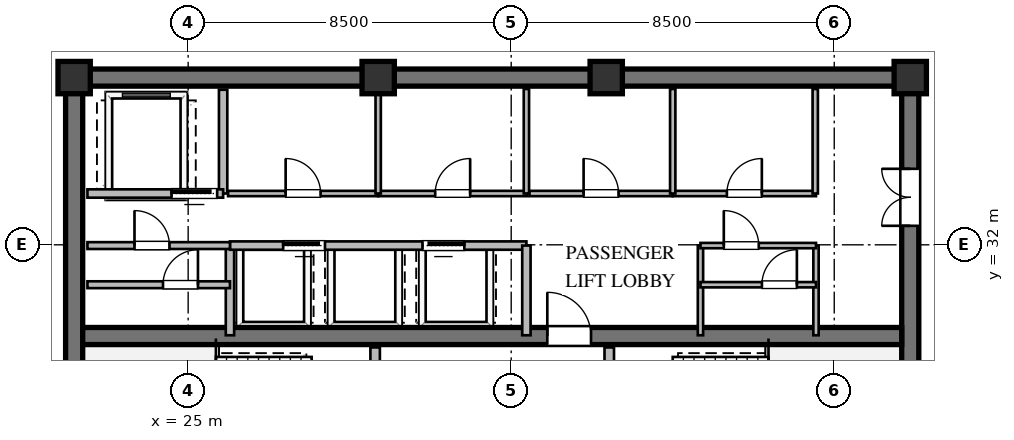
"""IFC4 building model, lengths in metres.
Left out: names, types, materials, properties, quantities, classifications, styles, units other than length and angle.
Written with IfcOpenShell. Run it as: python <this file> out.ifc"""

import sys

from ifc_helpers import new_model, si_unit, direction, frame, frame_2d, origin, origin_2d, place, context, subcontext, project, spatial, rectangle, extrude, element, fill, save


model = new_model("IFC4")
c1 = context("Model", 3, precision=1e-05, world=origin(), true_north=direction((0.0, 1.0)))
c2 = subcontext(c1, "Body", "Model", "MODEL_VIEW")
j1 = project(units=[si_unit("LENGTHUNIT", "METRE"), si_unit("PLANEANGLEUNIT", "RADIAN")], contexts=[c1])
p1 = place(None, origin())
s1 = spatial("IfcSite", under=j1, at=p1, CompositionType="ELEMENT")
p2 = place(p1, origin())
s2 = spatial("IfcBuilding", under=s1, at=p2, CompositionType="ELEMENT")
p3 = place(p2, frame((0.0, 0.0, 224.4)))
s3 = spatial("IfcBuildingStorey", under=s2, at=p3, CompositionType="ELEMENT", Elevation=224.4)
p4 = place(p3, frame((21.775, 36.4, 0.0), z_axis=(0.0, 0.0, 1.0), x_axis=(1.0, 0.0, 0.0)))
e1 = element("IfcWall", 1, at=p4, inside=s3, PredefinedType="SHEAR", context=c2, shape_type="SweptSolid", body=[
    extrude(rectangle(XDim=22.45, YDim=0.45, at=frame_2d((11.225, 0.0))), origin(), (0.0, 0.0, 1.0), 3.36),
])
p5 = place(p3, frame((22.0, 23.825, 0.0), z_axis=(0.0, 0.0, 1.0), x_axis=(0.0, 1.0, 0.0)))
e2 = element("IfcWall", 2, at=p5, inside=s3, PredefinedType="SHEAR", context=c2, shape_type="SweptSolid", body=[
    extrude(rectangle(XDim=12.35, YDim=0.45, at=frame_2d((6.175, 0.0))), origin(), (0.0, 0.0, 1.0), 3.36),
])
p6 = place(p3, frame((44.0, 23.825, 0.0), z_axis=(0.0, 0.0, 1.0), x_axis=(0.0, 1.0, 0.0)))
e3 = element("IfcWall", 3, at=p6, inside=s3, PredefinedType="SHEAR", context=c2, shape_type="SweptSolid", body=[
    extrude(rectangle(XDim=12.35, YDim=0.45, at=frame_2d((6.175, 0.0))), origin(), (0.0, 0.0, 1.0), 3.36),
])
p7 = place(p6, frame((8.675, 0.0, 0.0)))
e4 = element("IfcOpeningElement", 4, at=p7, cuts=e3, PredefinedType="OPENING", context=c2, shape_type="SweptSolid", body=[
    extrude(rectangle(XDim=1.5, YDim=2.15, at=frame_2d((0.75, 1.075))), frame((0.0, 0.235, 0.0), z_axis=(0.0, -1.0, 0.0), x_axis=(1.0, 0.0, 0.0)), (0.0, 0.0, 1.0), 0.47),
])
p8 = place(p3, frame((22.225, 29.6, 0.0), z_axis=(0.0, 0.0, 1.0), x_axis=(1.0, 0.0, 0.0)))
e5 = element("IfcWall", 5, at=p8, inside=s3, PredefinedType="SHEAR", context=c2, shape_type="SweptSolid", body=[
    extrude(rectangle(XDim=21.55, YDim=0.45, at=frame_2d((10.775, 0.0))), origin(), (0.0, 0.0, 1.0), 3.36),
])
p9 = place(p8, frame((12.225, 0.0, 0.0)))
e6 = element("IfcOpeningElement", 6, at=p9, cuts=e5, PredefinedType="OPENING", context=c2, shape_type="SweptSolid", body=[
    extrude(rectangle(XDim=1.15, YDim=2.1, at=frame_2d((0.575, 1.05))), frame((0.0, 0.235, 0.0), z_axis=(0.0, -1.0, 0.0), x_axis=(1.0, 0.0, 0.0)), (0.0, 0.0, 1.0), 0.47),
])
for number, where, z_axis, x_axis in (
    (7, (44.0, 36.4, 0.0), (0.0, 0.0, 1.0), (1.0, 0.0, 0.0)),
    (8, (36.0, 36.4, 0.0), (0.0, 0.0, 1.0), (1.0, 0.0, 0.0)),
    (9, (30.0, 36.4, 0.0), (0.0, 0.0, 1.0), (1.0, 0.0, 0.0)),
    (10, (22.0, 36.4, 0.0), (0.0, 0.0, 1.0), (1.0, 0.0, 0.0)),
):
    element("IfcColumn", number, at=place(p3, frame(where, z_axis=z_axis, x_axis=x_axis)), inside=s3, PredefinedType="COLUMN", context=c2, shape_type="SweptSolid", body=[
        extrude(rectangle(XDim=0.85, YDim=0.85, at=origin_2d()), origin(), (0.0, 0.0, 1.0), 3.6),
    ])
p10 = place(p3, frame((29.92, 23.9, 0.0), z_axis=(0.0, 0.0, 1.0), x_axis=(0.0, 1.0, 0.0)))
e11 = element("IfcWall", 11, at=p10, inside=s3, PredefinedType="SOLIDWALL", context=c2, shape_type="SweptSolid", body=[
    extrude(rectangle(XDim=5.4, YDim=0.25, at=frame_2d((2.7, 0.0))), origin(), (0.0, 0.0, 1.0), 3.36),
])
p11 = place(p10, frame((3.421, 0.0, 0.0)))
e12 = element("IfcOpeningElement", 12, at=p11, cuts=e11, PredefinedType="OPENING", context=c2, shape_type="SweptSolid", body=[
    extrude(rectangle(XDim=1.15, YDim=2.1, at=frame_2d((0.575, 1.05))), frame((0.0, 0.135, 0.0), z_axis=(0.0, -1.0, 0.0), x_axis=(1.0, 0.0, 0.0)), (0.0, 0.0, 1.0), 0.27),
])
p12 = place(p3, frame((36.08, 23.9, 0.0), z_axis=(0.0, 0.0, 1.0), x_axis=(0.0, 1.0, 0.0)))
e13 = element("IfcWall", 13, at=p12, inside=s3, PredefinedType="SOLIDWALL", context=c2, shape_type="SweptSolid", body=[
    extrude(rectangle(XDim=5.4, YDim=0.25, at=frame_2d((2.7, 0.0))), origin(), (0.0, 0.0, 1.0), 3.36),
])
p13 = place(p12, frame((3.421, 0.0, 0.0)))
e14 = element("IfcOpeningElement", 14, at=p13, cuts=e13, PredefinedType="OPENING", context=c2, shape_type="SweptSolid", body=[
    extrude(rectangle(XDim=1.15, YDim=2.1, at=frame_2d((0.575, 1.05))), frame((0.0, 0.135, 0.0), z_axis=(0.0, -1.0, 0.0), x_axis=(1.0, 0.0, 0.0)), (0.0, 0.0, 1.0), 0.27),
])
p14 = place(p3, frame((25.92, 33.35, 0.0), z_axis=(0.0, 0.0, 1.0), x_axis=(0.0, 1.0, 0.0)))
e15 = element("IfcWall", 15, at=p14, inside=s3, PredefinedType="SOLIDWALL", context=c2, shape_type="SweptSolid", body=[
    extrude(rectangle(XDim=2.73, YDim=0.22, at=frame_2d((1.365, 0.0))), origin(), (0.0, 0.0, 1.0), 3.36),
])
p15 = place(p3, frame((22.35, 33.35, 0.0), z_axis=(0.0, 0.0, 1.0), x_axis=(1.0, 0.0, 0.0)))
e16 = element("IfcWall", 16, at=p15, inside=s3, PredefinedType="SOLIDWALL", context=c2, shape_type="SweptSolid", body=[
    extrude(rectangle(XDim=3.57, YDim=0.22, at=frame_2d((1.785, 0.0))), origin(), (0.0, 0.0, 1.0), 3.36),
])
p16 = place(p15, frame((2.213, 0.0, 0.0)))
e17 = element("IfcOpeningElement", 17, at=p16, cuts=e16, PredefinedType="OPENING", context=c2, shape_type="SweptSolid", body=[
    extrude(rectangle(XDim=1.2, YDim=2.1, at=frame_2d((0.6, 1.05))), frame((0.0, 0.12, 0.0), z_axis=(0.0, -1.0, 0.0), x_axis=(1.0, 0.0, 0.0)), (0.0, 0.0, 1.0), 0.24),
])
p17 = place(p3, frame((26.1, 29.62, 0.0), z_axis=(0.0, 0.0, 1.0), x_axis=(0.0, 1.0, 0.0)))
e18 = element("IfcWall", 18, at=p17, inside=s3, PredefinedType="SOLIDWALL", context=c2, shape_type="SweptSolid", body=[
    extrude(rectangle(XDim=2.36, YDim=0.22, at=frame_2d((1.18, 0.0))), origin(), (0.0, 0.0, 1.0), 3.36),
])
p18 = place(p3, frame((26.1, 31.98, 0.0), z_axis=(0.0, 0.0, 1.0), x_axis=(1.0, 0.0, 0.0)))
e19 = element("IfcWall", 19, at=p18, inside=s3, PredefinedType="SOLIDWALL", context=c2, shape_type="SweptSolid", body=[
    extrude(rectangle(XDim=7.8, YDim=0.22, at=frame_2d((3.9, 0.0))), origin(), (0.0, 0.0, 1.0), 3.36),
])
p19 = place(p18, frame((1.4, 0.0, 0.0)))
e20 = element("IfcOpeningElement", 20, at=p19, cuts=e19, PredefinedType="OPENING", context=c2, shape_type="SweptSolid", body=[
    extrude(rectangle(XDim=1.1, YDim=2.1, at=frame_2d((0.55, 1.05))), frame((0.0, 0.12, 0.0), z_axis=(0.0, -1.0, 0.0), x_axis=(1.0, 0.0, 0.0)), (0.0, 0.0, 1.0), 0.24),
])
p20 = place(p18, frame((5.066, 0.0, 0.0)))
e21 = element("IfcOpeningElement", 21, at=p20, cuts=e19, PredefinedType="OPENING", context=c2, shape_type="SweptSolid", body=[
    extrude(rectangle(XDim=1.1, YDim=2.1, at=frame_2d((0.55, 1.05))), frame((0.0, 0.12, 0.0), z_axis=(0.0, -1.0, 0.0), x_axis=(1.0, 0.0, 0.0)), (0.0, 0.0, 1.0), 0.24),
])
p21 = place(p3, frame((33.9, 29.62, 0.0), z_axis=(0.0, 0.0, 1.0), x_axis=(0.0, 1.0, 0.0)))
e22 = element("IfcWall", 22, at=p21, inside=s3, PredefinedType="SOLIDWALL", context=c2, shape_type="SweptSolid", body=[
    extrude(rectangle(XDim=2.36, YDim=0.22, at=frame_2d((1.18, 0.0))), origin(), (0.0, 0.0, 1.0), 3.36),
])
p22 = place(p3, frame((26.05, 33.35, 0.0), z_axis=(0.0, 0.0, 1.0), x_axis=(1.0, 0.0, 0.0)))
e23 = element("IfcWall", 23, at=p22, inside=s3, PredefinedType="PARTITIONING", context=c2, shape_type="SweptSolid", body=[
    extrude(rectangle(XDim=3.95, YDim=0.14, at=frame_2d((1.975, 0.0))), origin(), (0.0, 0.0, 1.0), 3.36),
])
p23 = place(p22, frame((1.515, 0.0, 0.0)))
e24 = element("IfcOpeningElement", 24, at=p23, cuts=e23, PredefinedType="OPENING", context=c2, shape_type="SweptSolid", body=[
    extrude(rectangle(XDim=0.92, YDim=2.1, at=frame_2d((0.46, 1.05))), frame((0.0, 0.08, 0.0), z_axis=(0.0, -1.0, 0.0), x_axis=(1.0, 0.0, 0.0)), (0.0, 0.0, 1.0), 0.16),
])
p24 = place(p3, frame((30.0, 33.35, 0.0), z_axis=(0.0, 0.0, 1.0), x_axis=(1.0, 0.0, 0.0)))
e25 = element("IfcWall", 25, at=p24, inside=s3, PredefinedType="PARTITIONING", context=c2, shape_type="SweptSolid", body=[
    extrude(rectangle(XDim=3.92, YDim=0.14, at=frame_2d((1.96, 0.0))), origin(), (0.0, 0.0, 1.0), 3.36),
])
p25 = place(p24, frame((1.5, 0.0, 0.0)))
e26 = element("IfcOpeningElement", 26, at=p25, cuts=e25, PredefinedType="OPENING", context=c2, shape_type="SweptSolid", body=[
    extrude(rectangle(XDim=0.92, YDim=2.1, at=frame_2d((0.46, 1.05))), frame((0.0, 0.08, 0.0), z_axis=(0.0, -1.0, 0.0), x_axis=(1.0, 0.0, 0.0)), (0.0, 0.0, 1.0), 0.16),
])
for number, where, z_axis, x_axis in (
    (27, (30.0, 33.35, 0.0), (0.0, 0.0, 1.0), (0.0, 1.0, 0.0)),
    (28, (33.9, 33.35, 0.0), (0.0, 0.0, 1.0), (0.0, 1.0, 0.0)),
):
    element("IfcWall", number, at=place(p3, frame(where, z_axis=z_axis, x_axis=x_axis)), inside=s3, PredefinedType="PARTITIONING", context=c2, shape_type="SweptSolid", body=[
        extrude(rectangle(XDim=2.75, YDim=0.14, at=frame_2d((1.375, 0.0))), origin(), (0.0, 0.0, 1.0), 3.36),
    ])
p26 = place(p3, frame((33.98, 33.35, 0.0), z_axis=(0.0, 0.0, 1.0), x_axis=(1.0, 0.0, 0.0)))
e29 = element("IfcWall", 29, at=p26, inside=s3, PredefinedType="PARTITIONING", context=c2, shape_type="SweptSolid", body=[
    extrude(rectangle(XDim=3.77, YDim=0.14, at=frame_2d((1.885, 0.0))), origin(), (0.0, 0.0, 1.0), 3.36),
])
p27 = place(p26, frame((1.425, 0.0, 0.0)))
e30 = element("IfcOpeningElement", 30, at=p27, cuts=e29, PredefinedType="OPENING", context=c2, shape_type="SweptSolid", body=[
    extrude(rectangle(XDim=0.92, YDim=2.1, at=frame_2d((0.46, 1.05))), frame((0.0, 0.08, 0.0), z_axis=(0.0, -1.0, 0.0), x_axis=(1.0, 0.0, 0.0)), (0.0, 0.0, 1.0), 0.16),
])
p28 = place(p3, frame((37.75, 33.35, 0.0), z_axis=(0.0, 0.0, 1.0), x_axis=(1.0, 0.0, 0.0)))
e31 = element("IfcWall", 31, at=p28, inside=s3, PredefinedType="PARTITIONING", context=c2, shape_type="SweptSolid", body=[
    extrude(rectangle(XDim=3.77, YDim=0.14, at=frame_2d((1.885, 0.0))), origin(), (0.0, 0.0, 1.0), 3.36),
])
p29 = place(p28, frame((1.425, 0.0, 0.0)))
e32 = element("IfcOpeningElement", 32, at=p29, cuts=e31, PredefinedType="OPENING", context=c2, shape_type="SweptSolid", body=[
    extrude(rectangle(XDim=0.92, YDim=2.1, at=frame_2d((0.46, 1.05))), frame((0.0, 0.08, 0.0), z_axis=(0.0, -1.0, 0.0), x_axis=(1.0, 0.0, 0.0)), (0.0, 0.0, 1.0), 0.16),
])
for number, where, z_axis, x_axis in (
    (33, (37.75, 33.35, 0.0), (0.0, 0.0, 1.0), (0.0, 1.0, 0.0)),
    (34, (41.5, 33.35, 0.0), (0.0, 0.0, 1.0), (0.0, 1.0, 0.0)),
):
    element("IfcWall", number, at=place(p3, frame(where, z_axis=z_axis, x_axis=x_axis)), inside=s3, PredefinedType="PARTITIONING", context=c2, shape_type="SweptSolid", body=[
        extrude(rectangle(XDim=2.75, YDim=0.14, at=frame_2d((1.375, 0.0))), origin(), (0.0, 0.0, 1.0), 3.36),
    ])
p30 = place(p3, frame((22.35, 30.95, 0.0), z_axis=(0.0, 0.0, 1.0), x_axis=(1.0, 0.0, 0.0)))
e35 = element("IfcWall", 35, at=p30, inside=s3, PredefinedType="PARTITIONING", context=c2, shape_type="SweptSolid", body=[
    extrude(rectangle(XDim=3.75, YDim=0.18, at=frame_2d((1.875, 0.0))), origin(), (0.0, 0.0, 1.0), 3.36),
])
p31 = place(p30, frame((1.988, 0.0, 0.0)))
e36 = element("IfcOpeningElement", 36, at=p31, cuts=e35, PredefinedType="OPENING", context=c2, shape_type="SweptSolid", body=[
    extrude(rectangle(XDim=0.92, YDim=2.1, at=frame_2d((0.46, 1.05))), frame((0.0, 0.1, 0.0), z_axis=(0.0, -1.0, 0.0), x_axis=(1.0, 0.0, 0.0)), (0.0, 0.0, 1.0), 0.2),
])
p32 = place(p3, frame((22.35, 31.98, 0.0), z_axis=(0.0, 0.0, 1.0), x_axis=(1.0, 0.0, 0.0)))
e37 = element("IfcWall", 37, at=p32, inside=s3, PredefinedType="PARTITIONING", context=c2, shape_type="SweptSolid", body=[
    extrude(rectangle(XDim=3.75, YDim=0.18, at=frame_2d((1.875, 0.0))), origin(), (0.0, 0.0, 1.0), 3.36),
])
p33 = place(p32, frame((1.238, 0.0, 0.0)))
e38 = element("IfcOpeningElement", 38, at=p33, cuts=e37, PredefinedType="OPENING", context=c2, shape_type="SweptSolid", body=[
    extrude(rectangle(XDim=0.92, YDim=2.1, at=frame_2d((0.46, 1.05))), frame((0.0, 0.1, 0.0), z_axis=(0.0, -1.0, 0.0), x_axis=(1.0, 0.0, 0.0)), (0.0, 0.0, 1.0), 0.2),
])
for number, where, z_axis, x_axis in (
    (39, (38.48, 29.62, 0.0), (0.0, 0.0, 1.0), (0.0, 1.0, 0.0)),
    (40, (41.52, 29.62, 0.0), (0.0, 0.0, 1.0), (0.0, 1.0, 0.0)),
):
    element("IfcWall", number, at=place(p3, frame(where, z_axis=z_axis, x_axis=x_axis)), inside=s3, PredefinedType="PARTITIONING", context=c2, shape_type="SweptSolid", body=[
        extrude(rectangle(XDim=2.36, YDim=0.14, at=frame_2d((1.18, 0.0))), origin(), (0.0, 0.0, 1.0), 3.36),
    ])
p34 = place(p3, frame((38.48, 30.95, 0.0), z_axis=(0.0, 0.0, 1.0), x_axis=(1.0, 0.0, 0.0)))
e41 = element("IfcWall", 41, at=p34, inside=s3, PredefinedType="PARTITIONING", context=c2, shape_type="SweptSolid", body=[
    extrude(rectangle(XDim=3.04, YDim=0.14, at=frame_2d((1.52, 0.0))), origin(), (0.0, 0.0, 1.0), 3.36),
])
p35 = place(p34, frame((1.617, 0.0, 0.0)))
e42 = element("IfcOpeningElement", 42, at=p35, cuts=e41, PredefinedType="OPENING", context=c2, shape_type="SweptSolid", body=[
    extrude(rectangle(XDim=0.92, YDim=2.1, at=frame_2d((0.46, 1.05))), frame((0.0, 0.08, 0.0), z_axis=(0.0, -1.0, 0.0), x_axis=(1.0, 0.0, 0.0)), (0.0, 0.0, 1.0), 0.16),
])
p36 = place(p3, frame((38.48, 31.98, 0.0), z_axis=(0.0, 0.0, 1.0), x_axis=(1.0, 0.0, 0.0)))
e43 = element("IfcWall", 43, at=p36, inside=s3, PredefinedType="PARTITIONING", context=c2, shape_type="SweptSolid", body=[
    extrude(rectangle(XDim=3.04, YDim=0.14, at=frame_2d((1.52, 0.0))), origin(), (0.0, 0.0, 1.0), 3.36),
])
p37 = place(p36, frame((0.614, 0.0, 0.0)))
e44 = element("IfcOpeningElement", 44, at=p37, cuts=e43, PredefinedType="OPENING", context=c2, shape_type="SweptSolid", body=[
    extrude(rectangle(XDim=0.92, YDim=2.1, at=frame_2d((0.46, 1.05))), frame((0.0, 0.08, 0.0), z_axis=(0.0, -1.0, 0.0), x_axis=(1.0, 0.0, 0.0)), (0.0, 0.0, 1.0), 0.16),
])
p38 = place(p9, origin())
e45 = element("IfcDoor", 45, at=p38, inside=s3, OperationType="SINGLE_SWING_LEFT", PredefinedType="DOOR", context=c2, shape_type="SweptSolid", body=[
    extrude(rectangle(XDim=1.15, YDim=2.1, at=frame_2d((0.575, 1.05))), frame((0.0, 0.025, 0.0), z_axis=(0.0, -1.0, 0.0), x_axis=(1.0, 0.0, 0.0)), (0.0, 0.0, 1.0), 0.05),
])
fill(e6, e45)
p39 = place(p7, origin())
e46 = element("IfcDoor", 46, at=p39, inside=s3, OperationType="DOUBLE_DOOR_SINGLE_SWING", PredefinedType="DOOR", context=c2, shape_type="SweptSolid", body=[
    extrude(rectangle(XDim=1.5, YDim=2.15, at=frame_2d((0.75, 1.075))), frame((0.0, 0.025, 0.0), z_axis=(0.0, -1.0, 0.0), x_axis=(1.0, 0.0, 0.0)), (0.0, 0.0, 1.0), 0.05),
])
fill(e4, e46)
p40 = place(p16, origin())
e47 = element("IfcDoor", 47, at=p40, inside=s3, OperationType="SLIDING_TO_LEFT", PredefinedType="DOOR", context=c2, shape_type="SweptSolid", body=[
    extrude(rectangle(XDim=1.2, YDim=2.1, at=frame_2d((0.6, 1.05))), frame((0.0, 0.025, 0.0), z_axis=(0.0, -1.0, 0.0), x_axis=(1.0, 0.0, 0.0)), (0.0, 0.0, 1.0), 0.05),
])
fill(e17, e47)
p41 = place(p19, origin())
e48 = element("IfcDoor", 48, at=p41, inside=s3, OperationType="SLIDING_TO_LEFT", PredefinedType="DOOR", context=c2, shape_type="SweptSolid", body=[
    extrude(rectangle(XDim=1.1, YDim=2.1, at=frame_2d((0.55, 1.05))), frame((0.0, 0.025, 0.0), z_axis=(0.0, -1.0, 0.0), x_axis=(1.0, 0.0, 0.0)), (0.0, 0.0, 1.0), 0.05),
])
fill(e20, e48)
p42 = place(p20, origin())
e49 = element("IfcDoor", 49, at=p42, inside=s3, OperationType="SLIDING_TO_RIGHT", PredefinedType="DOOR", context=c2, shape_type="SweptSolid", body=[
    extrude(rectangle(XDim=1.1, YDim=2.1, at=frame_2d((0.55, 1.05))), frame((0.0, 0.025, 0.0), z_axis=(0.0, -1.0, 0.0), x_axis=(1.0, 0.0, 0.0)), (0.0, 0.0, 1.0), 0.05),
])
fill(e21, e49)
p43 = place(p23, origin())
e50 = element("IfcDoor", 50, at=p43, inside=s3, OperationType="SINGLE_SWING_LEFT", PredefinedType="DOOR", context=c2, shape_type="SweptSolid", body=[
    extrude(rectangle(XDim=0.92, YDim=2.1, at=frame_2d((0.46, 1.05))), frame((0.0, 0.025, 0.0), z_axis=(0.0, -1.0, 0.0), x_axis=(1.0, 0.0, 0.0)), (0.0, 0.0, 1.0), 0.05),
])
fill(e24, e50)
p44 = place(p25, origin())
e51 = element("IfcDoor", 51, at=p44, inside=s3, OperationType="SINGLE_SWING_RIGHT", PredefinedType="DOOR", context=c2, shape_type="SweptSolid", body=[
    extrude(rectangle(XDim=0.92, YDim=2.1, at=frame_2d((0.46, 1.05))), frame((0.0, 0.025, 0.0), z_axis=(0.0, -1.0, 0.0), x_axis=(1.0, 0.0, 0.0)), (0.0, 0.0, 1.0), 0.05),
])
fill(e26, e51)
p45 = place(p27, origin())
e52 = element("IfcDoor", 52, at=p45, inside=s3, OperationType="SINGLE_SWING_LEFT", PredefinedType="DOOR", context=c2, shape_type="SweptSolid", body=[
    extrude(rectangle(XDim=0.92, YDim=2.1, at=frame_2d((0.46, 1.05))), frame((0.0, 0.025, 0.0), z_axis=(0.0, -1.0, 0.0), x_axis=(1.0, 0.0, 0.0)), (0.0, 0.0, 1.0), 0.05),
])
fill(e30, e52)
p46 = place(p29, origin())
e53 = element("IfcDoor", 53, at=p46, inside=s3, OperationType="SINGLE_SWING_RIGHT", PredefinedType="DOOR", context=c2, shape_type="SweptSolid", body=[
    extrude(rectangle(XDim=0.92, YDim=2.1, at=frame_2d((0.46, 1.05))), frame((0.0, 0.025, 0.0), z_axis=(0.0, -1.0, 0.0), x_axis=(1.0, 0.0, 0.0)), (0.0, 0.0, 1.0), 0.05),
])
fill(e32, e53)
p47 = place(p33, origin())
e54 = element("IfcDoor", 54, at=p47, inside=s3, OperationType="SINGLE_SWING_LEFT", PredefinedType="DOOR", context=c2, shape_type="SweptSolid", body=[
    extrude(rectangle(XDim=0.92, YDim=2.1, at=frame_2d((0.46, 1.05))), frame((0.0, 0.025, 0.0), z_axis=(0.0, -1.0, 0.0), x_axis=(1.0, 0.0, 0.0)), (0.0, 0.0, 1.0), 0.05),
])
fill(e38, e54)
p48 = place(p31, origin())
e55 = element("IfcDoor", 55, at=p48, inside=s3, OperationType="SINGLE_SWING_RIGHT", PredefinedType="DOOR", context=c2, shape_type="SweptSolid", body=[
    extrude(rectangle(XDim=0.92, YDim=2.1, at=frame_2d((0.46, 1.05))), frame((0.0, 0.025, 0.0), z_axis=(0.0, -1.0, 0.0), x_axis=(1.0, 0.0, 0.0)), (0.0, 0.0, 1.0), 0.05),
])
fill(e36, e55)
p49 = place(p37, origin())
e56 = element("IfcDoor", 56, at=p49, inside=s3, OperationType="SINGLE_SWING_LEFT", PredefinedType="DOOR", context=c2, shape_type="SweptSolid", body=[
    extrude(rectangle(XDim=0.92, YDim=2.1, at=frame_2d((0.46, 1.05))), frame((0.0, 0.025, 0.0), z_axis=(0.0, -1.0, 0.0), x_axis=(1.0, 0.0, 0.0)), (0.0, 0.0, 1.0), 0.05),
])
fill(e44, e56)
p50 = place(p35, origin())
e57 = element("IfcDoor", 57, at=p50, inside=s3, OperationType="SINGLE_SWING_RIGHT", PredefinedType="DOOR", context=c2, shape_type="SweptSolid", body=[
    extrude(rectangle(XDim=0.92, YDim=2.1, at=frame_2d((0.46, 1.05))), frame((0.0, 0.025, 0.0), z_axis=(0.0, -1.0, 0.0), x_axis=(1.0, 0.0, 0.0)), (0.0, 0.0, 1.0), 0.05),
])
fill(e42, e57)
save(model, sys.argv[1])
